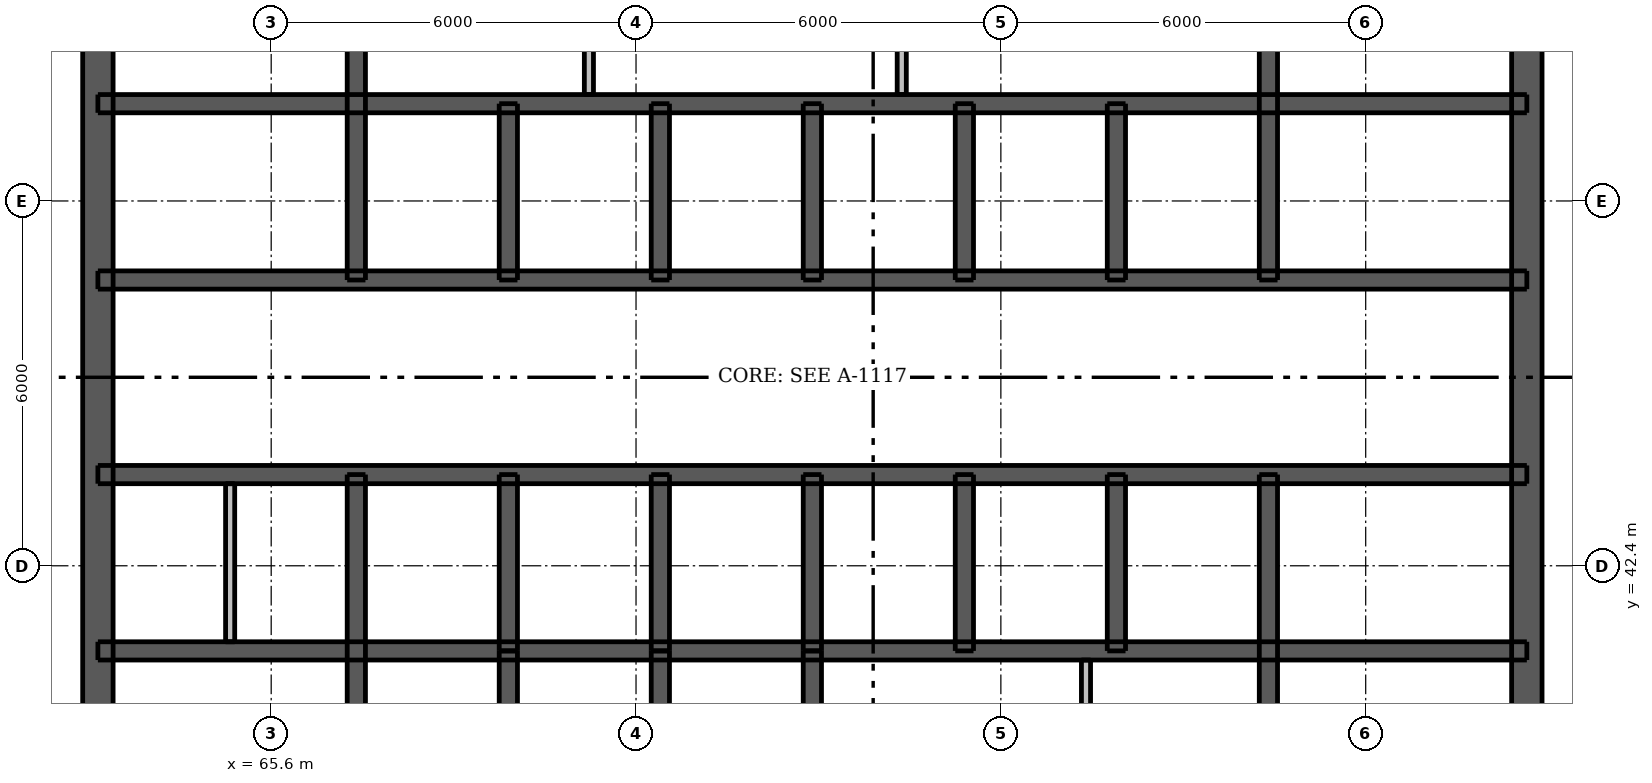
"""IFC4 building model, lengths in metres.
Left out: names, types, materials, properties, quantities, classifications, styles, units other than length and angle.
Written with IfcOpenShell. Run it as: python <this file> out.ifc"""

import sys

from ifc_helpers import new_model, si_unit, direction, frame, frame_2d, origin, place, context, subcontext, project, spatial, rectangle, extrude, element, fill, save


model = new_model("IFC4")
c1 = context("Model", 3, precision=1e-05, world=origin(), true_north=direction((0.0, 1.0)))
c2 = subcontext(c1, "Body", "Model", "MODEL_VIEW")
j1 = project(units=[si_unit("LENGTHUNIT", "METRE"), si_unit("PLANEANGLEUNIT", "RADIAN")], contexts=[c1])
p1 = place(None, origin())
s1 = spatial("IfcSite", under=j1, at=p1, CompositionType="ELEMENT")
p2 = place(p1, origin())
s2 = spatial("IfcBuilding", under=s1, at=p2, CompositionType="ELEMENT")
p3 = place(p2, frame((0.0, 0.0, 252.1)))
s3 = spatial("IfcBuildingStorey", under=s2, at=p3, CompositionType="ELEMENT", Elevation=252.1)
p4 = place(p3, frame((62.75, 33.5, 0.0), z_axis=(0.0, 0.0, 1.0), x_axis=(0.0, 1.0, 0.0)))
e1 = element("IfcWall", 1, at=p4, inside=s3, PredefinedType="SHEAR", context=c2, shape_type="SweptSolid", body=[
    extrude(rectangle(XDim=24.0, YDim=0.5, at=frame_2d((12.0, 0.0))), origin(), (0.0, 0.0, 1.0), 3.05),
])
p5 = place(p4, frame((11.2, 0.0, 0.0)))
e2 = element("IfcOpeningElement", 2, at=p5, cuts=e1, PredefinedType="OPENING", context=c2, shape_type="SweptSolid", body=[
    extrude(rectangle(XDim=1.6, YDim=2.1, at=frame_2d((0.8, 1.05))), frame((0.0, 0.26, 0.0), z_axis=(0.0, -1.0, 0.0), x_axis=(1.0, 0.0, 0.0)), (0.0, 0.0, 1.0), 0.52),
])
p6 = place(p3, frame((86.25, 33.5, 0.0), z_axis=(0.0, 0.0, 1.0), x_axis=(0.0, 1.0, 0.0)))
e3 = element("IfcWall", 3, at=p6, inside=s3, PredefinedType="SHEAR", context=c2, shape_type="SweptSolid", body=[
    extrude(rectangle(XDim=24.0, YDim=0.5, at=frame_2d((12.0, 0.0))), origin(), (0.0, 0.0, 1.0), 3.05),
])
p7 = place(p6, frame((11.2, 0.0, 0.0)))
e4 = element("IfcOpeningElement", 4, at=p7, cuts=e3, PredefinedType="OPENING", context=c2, shape_type="SweptSolid", body=[
    extrude(rectangle(XDim=1.6, YDim=2.1, at=frame_2d((0.8, 1.05))), frame((0.0, 0.26, 0.0), z_axis=(0.0, -1.0, 0.0), x_axis=(1.0, 0.0, 0.0)), (0.0, 0.0, 1.0), 0.52),
])
p8 = place(p3, frame((62.75, 41.0, 0.0), z_axis=(0.0, 0.0, 1.0), x_axis=(1.0, 0.0, 0.0)))
e5 = element("IfcWall", 5, at=p8, inside=s3, PredefinedType="SHEAR", context=c2, shape_type="SweptSolid", body=[
    extrude(rectangle(XDim=23.5, YDim=0.3, at=frame_2d((11.75, 0.0))), origin(), (0.0, 0.0, 1.0), 3.05),
])
p9 = place(p3, frame((62.75, 43.9, 0.0), z_axis=(0.0, 0.0, 1.0), x_axis=(1.0, 0.0, 0.0)))
e6 = element("IfcWall", 6, at=p9, inside=s3, PredefinedType="SHEAR", context=c2, shape_type="SweptSolid", body=[
    extrude(rectangle(XDim=23.5, YDim=0.3, at=frame_2d((11.75, 0.0))), origin(), (0.0, 0.0, 1.0), 3.05),
])
p10 = place(p9, frame((0.762, 0.0, 0.0)))
e7 = element("IfcOpeningElement", 7, at=p10, cuts=e6, PredefinedType="OPENING", context=c2, shape_type="SweptSolid", body=[
    extrude(rectangle(XDim=0.9, YDim=2.1, at=frame_2d((0.45, 1.05))), frame((0.0, 0.16, 0.0), z_axis=(0.0, -1.0, 0.0), x_axis=(1.0, 0.0, 0.0)), (0.0, 0.0, 1.0), 0.32),
])
p11 = place(p9, frame((2.688, 0.0, 0.0)))
e8 = element("IfcOpeningElement", 8, at=p11, cuts=e6, PredefinedType="OPENING", context=c2, shape_type="SweptSolid", body=[
    extrude(rectangle(XDim=0.9, YDim=2.1, at=frame_2d((0.45, 1.05))), frame((0.0, 0.16, 0.0), z_axis=(0.0, -1.0, 0.0), x_axis=(1.0, 0.0, 0.0)), (0.0, 0.0, 1.0), 0.32),
])
p12 = place(p9, frame((20.875, 0.0, 0.0)))
e9 = element("IfcOpeningElement", 9, at=p12, cuts=e6, PredefinedType="OPENING", context=c2, shape_type="SweptSolid", body=[
    extrude(rectangle(XDim=0.9, YDim=2.1, at=frame_2d((0.45, 1.05))), frame((0.0, 0.16, 0.0), z_axis=(0.0, -1.0, 0.0), x_axis=(1.0, 0.0, 0.0)), (0.0, 0.0, 1.0), 0.32),
])
p13 = place(p9, frame((5.05, 0.0, 0.0)))
e10 = element("IfcOpeningElement", 10, at=p13, cuts=e6, PredefinedType="OPENING", context=c2, shape_type="SweptSolid", body=[
    extrude(rectangle(XDim=0.9, YDim=2.1, at=frame_2d((0.45, 1.05))), frame((0.0, 0.16, 0.0), z_axis=(0.0, -1.0, 0.0), x_axis=(1.0, 0.0, 0.0)), (0.0, 0.0, 1.0), 0.32),
])
p14 = place(p9, frame((7.55, 0.0, 0.0)))
e11 = element("IfcOpeningElement", 11, at=p14, cuts=e6, PredefinedType="OPENING", context=c2, shape_type="SweptSolid", body=[
    extrude(rectangle(XDim=0.9, YDim=2.1, at=frame_2d((0.45, 1.05))), frame((0.0, 0.16, 0.0), z_axis=(0.0, -1.0, 0.0), x_axis=(1.0, 0.0, 0.0)), (0.0, 0.0, 1.0), 0.32),
])
p15 = place(p9, frame((12.55, 0.0, 0.0)))
e12 = element("IfcOpeningElement", 12, at=p15, cuts=e6, PredefinedType="OPENING", context=c2, shape_type="SweptSolid", body=[
    extrude(rectangle(XDim=0.9, YDim=2.1, at=frame_2d((0.45, 1.05))), frame((0.0, 0.16, 0.0), z_axis=(0.0, -1.0, 0.0), x_axis=(1.0, 0.0, 0.0)), (0.0, 0.0, 1.0), 0.32),
])
p16 = place(p9, frame((15.05, 0.0, 0.0)))
e13 = element("IfcOpeningElement", 13, at=p16, cuts=e6, PredefinedType="OPENING", context=c2, shape_type="SweptSolid", body=[
    extrude(rectangle(XDim=0.9, YDim=2.1, at=frame_2d((0.45, 1.05))), frame((0.0, 0.16, 0.0), z_axis=(0.0, -1.0, 0.0), x_axis=(1.0, 0.0, 0.0)), (0.0, 0.0, 1.0), 0.32),
])
p17 = place(p3, frame((62.75, 47.1, 0.0), z_axis=(0.0, 0.0, 1.0), x_axis=(1.0, 0.0, 0.0)))
e14 = element("IfcWall", 14, at=p17, inside=s3, PredefinedType="SHEAR", context=c2, shape_type="SweptSolid", body=[
    extrude(rectangle(XDim=23.5, YDim=0.3, at=frame_2d((11.75, 0.0))), origin(), (0.0, 0.0, 1.0), 3.05),
])
p18 = place(p17, frame((1.725, 0.0, 0.0)))
e15 = element("IfcOpeningElement", 15, at=p18, cuts=e14, PredefinedType="OPENING", context=c2, shape_type="SweptSolid", body=[
    extrude(rectangle(XDim=0.9, YDim=2.1, at=frame_2d((0.45, 1.05))), frame((0.0, 0.16, 0.0), z_axis=(0.0, -1.0, 0.0), x_axis=(1.0, 0.0, 0.0)), (0.0, 0.0, 1.0), 0.32),
])
p19 = place(p17, frame((20.875, 0.0, 0.0)))
e16 = element("IfcOpeningElement", 16, at=p19, cuts=e14, PredefinedType="OPENING", context=c2, shape_type="SweptSolid", body=[
    extrude(rectangle(XDim=0.9, YDim=2.1, at=frame_2d((0.45, 1.05))), frame((0.0, 0.16, 0.0), z_axis=(0.0, -1.0, 0.0), x_axis=(1.0, 0.0, 0.0)), (0.0, 0.0, 1.0), 0.32),
])
p20 = place(p17, frame((4.95, 0.0, 0.0)))
e17 = element("IfcOpeningElement", 17, at=p20, cuts=e14, PredefinedType="OPENING", context=c2, shape_type="SweptSolid", body=[
    extrude(rectangle(XDim=1.1, YDim=2.1, at=frame_2d((0.55, 1.05))), frame((0.0, 0.16, 0.0), z_axis=(0.0, -1.0, 0.0), x_axis=(1.0, 0.0, 0.0)), (0.0, 0.0, 1.0), 0.32),
])
p21 = place(p17, frame((7.45, 0.0, 0.0)))
e18 = element("IfcOpeningElement", 18, at=p21, cuts=e14, PredefinedType="OPENING", context=c2, shape_type="SweptSolid", body=[
    extrude(rectangle(XDim=1.1, YDim=2.1, at=frame_2d((0.55, 1.05))), frame((0.0, 0.16, 0.0), z_axis=(0.0, -1.0, 0.0), x_axis=(1.0, 0.0, 0.0)), (0.0, 0.0, 1.0), 0.32),
])
p22 = place(p17, frame((9.95, 0.0, 0.0)))
e19 = element("IfcOpeningElement", 19, at=p22, cuts=e14, PredefinedType="OPENING", context=c2, shape_type="SweptSolid", body=[
    extrude(rectangle(XDim=1.1, YDim=2.1, at=frame_2d((0.55, 1.05))), frame((0.0, 0.16, 0.0), z_axis=(0.0, -1.0, 0.0), x_axis=(1.0, 0.0, 0.0)), (0.0, 0.0, 1.0), 0.32),
])
p23 = place(p17, frame((12.45, 0.0, 0.0)))
e20 = element("IfcOpeningElement", 20, at=p23, cuts=e14, PredefinedType="OPENING", context=c2, shape_type="SweptSolid", body=[
    extrude(rectangle(XDim=1.1, YDim=2.1, at=frame_2d((0.55, 1.05))), frame((0.0, 0.16, 0.0), z_axis=(0.0, -1.0, 0.0), x_axis=(1.0, 0.0, 0.0)), (0.0, 0.0, 1.0), 0.32),
])
p24 = place(p17, frame((14.95, 0.0, 0.0)))
e21 = element("IfcOpeningElement", 21, at=p24, cuts=e14, PredefinedType="OPENING", context=c2, shape_type="SweptSolid", body=[
    extrude(rectangle(XDim=1.1, YDim=2.1, at=frame_2d((0.55, 1.05))), frame((0.0, 0.16, 0.0), z_axis=(0.0, -1.0, 0.0), x_axis=(1.0, 0.0, 0.0)), (0.0, 0.0, 1.0), 0.32),
])
p25 = place(p17, frame((17.45, 0.0, 0.0)))
e22 = element("IfcOpeningElement", 22, at=p25, cuts=e14, PredefinedType="OPENING", context=c2, shape_type="SweptSolid", body=[
    extrude(rectangle(XDim=1.1, YDim=2.1, at=frame_2d((0.55, 1.05))), frame((0.0, 0.16, 0.0), z_axis=(0.0, -1.0, 0.0), x_axis=(1.0, 0.0, 0.0)), (0.0, 0.0, 1.0), 0.32),
])
p26 = place(p3, frame((62.75, 50.0, 0.0), z_axis=(0.0, 0.0, 1.0), x_axis=(1.0, 0.0, 0.0)))
e23 = element("IfcWall", 23, at=p26, inside=s3, PredefinedType="SHEAR", context=c2, shape_type="SweptSolid", body=[
    extrude(rectangle(XDim=23.5, YDim=0.3, at=frame_2d((11.75, 0.0))), origin(), (0.0, 0.0, 1.0), 3.05),
])
p27 = place(p3, frame((67.0, 33.75, 0.0), z_axis=(0.0, 0.0, 1.0), x_axis=(0.0, 1.0, 0.0)))
e24 = element("IfcWall", 24, at=p27, inside=s3, PredefinedType="SHEAR", context=c2, shape_type="SweptSolid", body=[
    extrude(rectangle(XDim=10.15, YDim=0.3, at=frame_2d((5.075, 0.0))), origin(), (0.0, 0.0, 1.0), 3.05),
])
p28 = place(p27, frame((0.45, 0.0, 0.0)))
e25 = element("IfcOpeningElement", 25, at=p28, cuts=e24, PredefinedType="OPENING", context=c2, shape_type="SweptSolid", body=[
    extrude(rectangle(XDim=1.1, YDim=2.1, at=frame_2d((0.55, 1.05))), frame((0.0, 0.16, 0.0), z_axis=(0.0, -1.0, 0.0), x_axis=(1.0, 0.0, 0.0)), (0.0, 0.0, 1.0), 0.32),
])
for number, where, z_axis, x_axis in (
    (26, (67.0, 47.1, 0.0), (0.0, 0.0, 1.0), (0.0, 1.0, 0.0)),
    (27, (82.0, 33.75, 0.0), (0.0, 0.0, 1.0), (0.0, 1.0, 0.0)),
    (28, (82.0, 47.1, 0.0), (0.0, 0.0, 1.0), (0.0, 1.0, 0.0)),
):
    element("IfcWall", number, at=place(p3, frame(where, z_axis=z_axis, x_axis=x_axis)), inside=s3, PredefinedType="SHEAR", context=c2, shape_type="SweptSolid", body=[
        extrude(rectangle(XDim=10.15, YDim=0.3, at=frame_2d((5.075, 0.0))), origin(), (0.0, 0.0, 1.0), 3.05),
    ])
for number, where, z_axis, x_axis in (
    (29, (69.5, 41.0, 0.0), (0.0, 0.0, 1.0), (0.0, 1.0, 0.0)),
    (30, (69.5, 47.1, 0.0), (0.0, 0.0, 1.0), (0.0, 1.0, 0.0)),
    (31, (72.0, 41.0, 0.0), (0.0, 0.0, 1.0), (0.0, 1.0, 0.0)),
    (32, (72.0, 47.1, 0.0), (0.0, 0.0, 1.0), (0.0, 1.0, 0.0)),
    (33, (74.5, 41.0, 0.0), (0.0, 0.0, 1.0), (0.0, 1.0, 0.0)),
    (34, (74.5, 47.1, 0.0), (0.0, 0.0, 1.0), (0.0, 1.0, 0.0)),
    (35, (77.0, 41.0, 0.0), (0.0, 0.0, 1.0), (0.0, 1.0, 0.0)),
    (36, (77.0, 47.1, 0.0), (0.0, 0.0, 1.0), (0.0, 1.0, 0.0)),
    (37, (79.5, 41.0, 0.0), (0.0, 0.0, 1.0), (0.0, 1.0, 0.0)),
    (38, (79.5, 47.1, 0.0), (0.0, 0.0, 1.0), (0.0, 1.0, 0.0)),
    (39, (69.5, 38.1, 0.0), (0.0, 0.0, 1.0), (0.0, 1.0, 0.0)),
    (40, (72.0, 38.1, 0.0), (0.0, 0.0, 1.0), (0.0, 1.0, 0.0)),
    (41, (74.5, 38.1, 0.0), (0.0, 0.0, 1.0), (0.0, 1.0, 0.0)),
):
    element("IfcWall", number, at=place(p3, frame(where, z_axis=z_axis, x_axis=x_axis)), inside=s3, PredefinedType="SHEAR", context=c2, shape_type="SweptSolid", body=[
        extrude(rectangle(XDim=2.9, YDim=0.3, at=frame_2d((1.45, 0.0))), origin(), (0.0, 0.0, 1.0), 3.05),
    ])
p29 = place(p3, frame((79.0, 34.0, 0.0), z_axis=(0.0, 0.0, 1.0), x_axis=(0.0, 1.0, 0.0)))
e42 = element("IfcWall", 42, at=p29, inside=s3, PredefinedType="PLUMBINGWALL", context=c2, shape_type="SweptSolid", body=[
    extrude(rectangle(XDim=6.85, YDim=0.15, at=frame_2d((3.425, 0.0))), origin(), (0.0, 0.0, 1.0), 3.05),
])
p30 = place(p3, frame((64.925, 41.15, 0.0), z_axis=(0.0, 0.0, 1.0), x_axis=(0.0, 1.0, 0.0)))
e43 = element("IfcWall", 43, at=p30, inside=s3, PredefinedType="PLUMBINGWALL", context=c2, shape_type="SweptSolid", body=[
    extrude(rectangle(XDim=2.6, YDim=0.15, at=frame_2d((1.3, 0.0))), origin(), (0.0, 0.0, 1.0), 3.05),
])
for number, where, z_axis, x_axis in (
    (44, (70.825, 50.15, 0.0), (0.0, 0.0, 1.0), (0.0, 1.0, 0.0)),
    (45, (75.97, 50.15, 0.0), (0.0, 0.0, 1.0), (0.0, 1.0, 0.0)),
):
    element("IfcWall", number, at=place(p3, frame(where, z_axis=z_axis, x_axis=x_axis)), inside=s3, PredefinedType="PLUMBINGWALL", context=c2, shape_type="SweptSolid", body=[
        extrude(rectangle(XDim=6.85, YDim=0.15, at=frame_2d((3.425, 0.0))), origin(), (0.0, 0.0, 1.0), 3.05),
    ])
p31 = place(p5, origin())
e46 = element("IfcDoor", 46, at=p31, inside=s3, OperationType="DOUBLE_DOOR_SINGLE_SWING", PredefinedType="DOOR", context=c2, shape_type="SweptSolid", body=[
    extrude(rectangle(XDim=1.6, YDim=2.1, at=frame_2d((0.8, 1.05))), frame((0.0, -0.188, 0.0), z_axis=(0.0, -1.0, 0.0), x_axis=(1.0, 0.0, 0.0)), (0.0, 0.0, 1.0), 0.05),
])
fill(e2, e46)
p32 = place(p7, origin())
e47 = element("IfcDoor", 47, at=p32, inside=s3, OperationType="DOUBLE_DOOR_SINGLE_SWING", PredefinedType="DOOR", context=c2, shape_type="SweptSolid", body=[
    extrude(rectangle(XDim=1.6, YDim=2.1, at=frame_2d((0.8, 1.05))), frame((0.0, 0.237, 0.0), z_axis=(0.0, -1.0, 0.0), x_axis=(1.0, 0.0, 0.0)), (0.0, 0.0, 1.0), 0.05),
])
fill(e4, e47)
p33 = place(p10, origin())
e48 = element("IfcDoor", 48, at=p33, inside=s3, OperationType="SINGLE_SWING_LEFT", PredefinedType="DOOR", context=c2, shape_type="SweptSolid", body=[
    extrude(rectangle(XDim=0.9, YDim=2.1, at=frame_2d((0.45, 1.05))), frame((0.0, -0.087, 0.0), z_axis=(0.0, -1.0, 0.0), x_axis=(1.0, 0.0, 0.0)), (0.0, 0.0, 1.0), 0.05),
])
fill(e7, e48)
p34 = place(p11, origin())
e49 = element("IfcDoor", 49, at=p34, inside=s3, OperationType="SINGLE_SWING_RIGHT", PredefinedType="DOOR", context=c2, shape_type="SweptSolid", body=[
    extrude(rectangle(XDim=0.9, YDim=2.1, at=frame_2d((0.45, 1.05))), frame((0.0, -0.087, 0.0), z_axis=(0.0, -1.0, 0.0), x_axis=(1.0, 0.0, 0.0)), (0.0, 0.0, 1.0), 0.05),
])
fill(e8, e49)
p35 = place(p12, origin())
e50 = element("IfcDoor", 50, at=p35, inside=s3, OperationType="SINGLE_SWING_LEFT", PredefinedType="DOOR", context=c2, shape_type="SweptSolid", body=[
    extrude(rectangle(XDim=0.9, YDim=2.1, at=frame_2d((0.45, 1.05))), frame((0.0, -0.087, 0.0), z_axis=(0.0, -1.0, 0.0), x_axis=(1.0, 0.0, 0.0)), (0.0, 0.0, 1.0), 0.05),
])
fill(e9, e50)
p36 = place(p18, origin())
e51 = element("IfcDoor", 51, at=p36, inside=s3, OperationType="SINGLE_SWING_LEFT", PredefinedType="DOOR", context=c2, shape_type="SweptSolid", body=[
    extrude(rectangle(XDim=0.9, YDim=2.1, at=frame_2d((0.45, 1.05))), frame((0.0, 0.138, 0.0), z_axis=(0.0, -1.0, 0.0), x_axis=(1.0, 0.0, 0.0)), (0.0, 0.0, 1.0), 0.05),
])
fill(e15, e51)
p37 = place(p19, origin())
e52 = element("IfcDoor", 52, at=p37, inside=s3, OperationType="SINGLE_SWING_LEFT", PredefinedType="DOOR", context=c2, shape_type="SweptSolid", body=[
    extrude(rectangle(XDim=0.9, YDim=2.1, at=frame_2d((0.45, 1.05))), frame((0.0, 0.138, 0.0), z_axis=(0.0, -1.0, 0.0), x_axis=(1.0, 0.0, 0.0)), (0.0, 0.0, 1.0), 0.05),
])
fill(e16, e52)
p38 = place(p13, origin())
e53 = element("IfcDoor", 53, at=p38, inside=s3, OperationType="SINGLE_SWING_RIGHT", PredefinedType="DOOR", context=c2, shape_type="SweptSolid", body=[
    extrude(rectangle(XDim=0.9, YDim=2.1, at=frame_2d((0.45, 1.05))), frame((0.0, -0.087, 0.0), z_axis=(0.0, -1.0, 0.0), x_axis=(1.0, 0.0, 0.0)), (0.0, 0.0, 1.0), 0.05),
])
fill(e10, e53)
p39 = place(p14, origin())
e54 = element("IfcDoor", 54, at=p39, inside=s3, OperationType="SINGLE_SWING_LEFT", PredefinedType="DOOR", context=c2, shape_type="SweptSolid", body=[
    extrude(rectangle(XDim=0.9, YDim=2.1, at=frame_2d((0.45, 1.05))), frame((0.0, -0.087, 0.0), z_axis=(0.0, -1.0, 0.0), x_axis=(1.0, 0.0, 0.0)), (0.0, 0.0, 1.0), 0.05),
])
fill(e11, e54)
p40 = place(p15, origin())
e55 = element("IfcDoor", 55, at=p40, inside=s3, OperationType="SINGLE_SWING_LEFT", PredefinedType="DOOR", context=c2, shape_type="SweptSolid", body=[
    extrude(rectangle(XDim=0.9, YDim=2.1, at=frame_2d((0.45, 1.05))), frame((0.0, -0.087, 0.0), z_axis=(0.0, -1.0, 0.0), x_axis=(1.0, 0.0, 0.0)), (0.0, 0.0, 1.0), 0.05),
])
fill(e12, e55)
p41 = place(p16, origin())
e56 = element("IfcDoor", 56, at=p41, inside=s3, OperationType="SINGLE_SWING_RIGHT", PredefinedType="DOOR", context=c2, shape_type="SweptSolid", body=[
    extrude(rectangle(XDim=0.9, YDim=2.1, at=frame_2d((0.45, 1.05))), frame((0.0, -0.087, 0.0), z_axis=(0.0, -1.0, 0.0), x_axis=(1.0, 0.0, 0.0)), (0.0, 0.0, 1.0), 0.05),
])
fill(e13, e56)
p42 = place(p20, origin())
e57 = element("IfcDoor", 57, at=p42, inside=s3, OperationType="DOUBLE_DOOR_SLIDING", PredefinedType="DOOR", context=c2, shape_type="SweptSolid", body=[
    extrude(rectangle(XDim=1.1, YDim=2.1, at=frame_2d((0.55, 1.05))), frame((0.0, 0.025, 0.0), z_axis=(0.0, -1.0, 0.0), x_axis=(1.0, 0.0, 0.0)), (0.0, 0.0, 1.0), 0.05),
])
fill(e17, e57)
p43 = place(p21, origin())
e58 = element("IfcDoor", 58, at=p43, inside=s3, OperationType="DOUBLE_DOOR_SLIDING", PredefinedType="DOOR", context=c2, shape_type="SweptSolid", body=[
    extrude(rectangle(XDim=1.1, YDim=2.1, at=frame_2d((0.55, 1.05))), frame((0.0, 0.025, 0.0), z_axis=(0.0, -1.0, 0.0), x_axis=(1.0, 0.0, 0.0)), (0.0, 0.0, 1.0), 0.05),
])
fill(e18, e58)
p44 = place(p22, origin())
e59 = element("IfcDoor", 59, at=p44, inside=s3, OperationType="DOUBLE_DOOR_SLIDING", PredefinedType="DOOR", context=c2, shape_type="SweptSolid", body=[
    extrude(rectangle(XDim=1.1, YDim=2.1, at=frame_2d((0.55, 1.05))), frame((0.0, 0.025, 0.0), z_axis=(0.0, -1.0, 0.0), x_axis=(1.0, 0.0, 0.0)), (0.0, 0.0, 1.0), 0.05),
])
fill(e19, e59)
p45 = place(p23, origin())
e60 = element("IfcDoor", 60, at=p45, inside=s3, OperationType="DOUBLE_DOOR_SLIDING", PredefinedType="DOOR", context=c2, shape_type="SweptSolid", body=[
    extrude(rectangle(XDim=1.1, YDim=2.1, at=frame_2d((0.55, 1.05))), frame((0.0, 0.025, 0.0), z_axis=(0.0, -1.0, 0.0), x_axis=(1.0, 0.0, 0.0)), (0.0, 0.0, 1.0), 0.05),
])
fill(e20, e60)
p46 = place(p24, origin())
e61 = element("IfcDoor", 61, at=p46, inside=s3, OperationType="DOUBLE_DOOR_SLIDING", PredefinedType="DOOR", context=c2, shape_type="SweptSolid", body=[
    extrude(rectangle(XDim=1.1, YDim=2.1, at=frame_2d((0.55, 1.05))), frame((0.0, 0.025, 0.0), z_axis=(0.0, -1.0, 0.0), x_axis=(1.0, 0.0, 0.0)), (0.0, 0.0, 1.0), 0.05),
])
fill(e21, e61)
p47 = place(p25, origin())
e62 = element("IfcDoor", 62, at=p47, inside=s3, OperationType="DOUBLE_DOOR_SLIDING", PredefinedType="DOOR", context=c2, shape_type="SweptSolid", body=[
    extrude(rectangle(XDim=1.1, YDim=2.1, at=frame_2d((0.55, 1.05))), frame((0.0, 0.025, 0.0), z_axis=(0.0, -1.0, 0.0), x_axis=(1.0, 0.0, 0.0)), (0.0, 0.0, 1.0), 0.05),
])
fill(e22, e62)
save(model, sys.argv[1])
